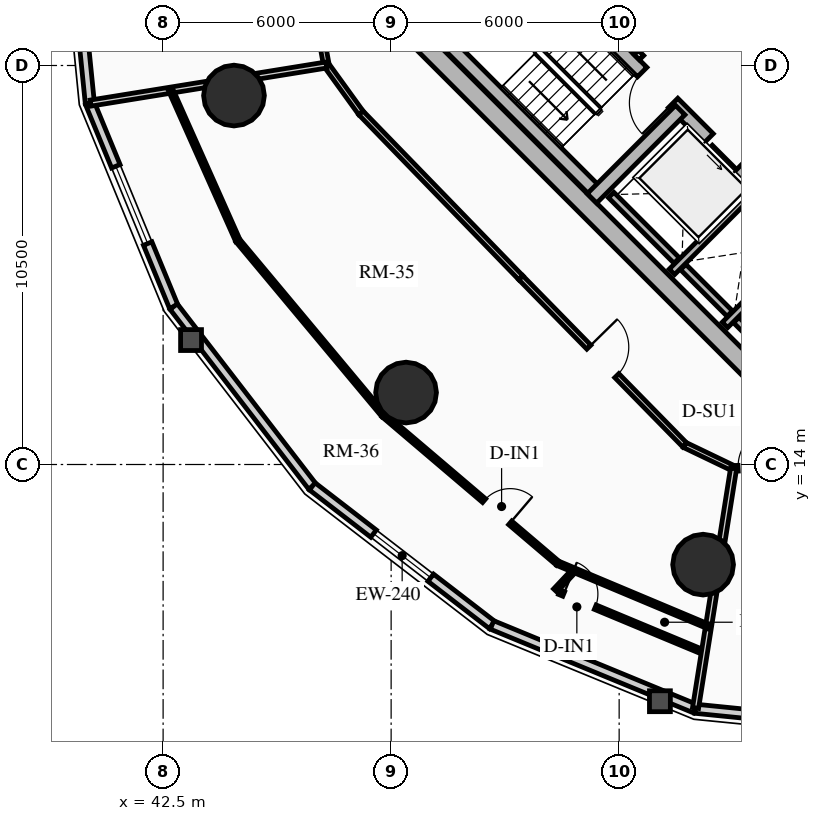
"""IFC4 building model, lengths in metres.
Left out: names, types, materials, properties, quantities, classifications, styles, units other than length and angle.
Written with IfcOpenShell. Run it as: python <this file> out.ifc"""

import sys

from ifc_helpers import new_model, si_unit, direction, frame, frame_2d, origin, origin_2d, place, context, subcontext, project, spatial, rectangle, circle, extrude, source, transform, mapped, element, fill, save


model = new_model("IFC4")
c1 = context("Model", 3, precision=1e-05, world=origin(), true_north=direction((0.0, 1.0)))
c2 = subcontext(c1, "Body", "Model", "MODEL_VIEW")
j1 = project(units=[si_unit("LENGTHUNIT", "METRE"), si_unit("PLANEANGLEUNIT", "RADIAN")], contexts=[c1])
p1 = place(None, origin())
s1 = spatial("IfcSite", under=j1, at=p1, CompositionType="ELEMENT")
p2 = place(p1, origin())
s2 = spatial("IfcBuilding", under=s1, at=p2, CompositionType="ELEMENT")
p3 = place(p2, frame((0.0, 0.0, 62.74)))
s3 = spatial("IfcBuildingStorey", under=s2, at=p3, CompositionType="ELEMENT", Elevation=62.74)
for number, where, z_axis, x_axis in (
    (1, (58.773, 15.661, 0.0), (0.0, 0.0, 1.0), (-0.707, 0.707, 0.0)),
    (2, (66.339, 23.227, 0.0), (0.0, 0.0, 1.0), (-0.707, 0.707, 0.0)),
):
    element("IfcWall", number, at=place(p3, frame(where, z_axis=z_axis, x_axis=x_axis)), inside=s3, PredefinedType="SHEAR", context=c2, shape_type="SweptSolid", body=[
        extrude(rectangle(XDim=14.3, YDim=0.5, at=frame_2d((7.15, 0.0))), origin(), (0.0, 0.0, 1.0), 2.91),
    ])
p4 = place(p3, frame((61.096, 18.338, 0.0), z_axis=(0.0, 0.0, 1.0), x_axis=(-0.707106781187, 0.707106781187, 0.0)))
e3 = element("IfcWall", 3, at=p4, inside=s3, PredefinedType="SHEAR", context=c2, shape_type="SweptSolid", body=[
    extrude(rectangle(XDim=13.8, YDim=0.35, at=frame_2d((6.9, 0.0))), origin(), (0.0, 0.0, 1.0), 2.91),
])
m1 = source(origin(), c2, "Body", "SweptSolid", [
    extrude(rectangle(XDim=1.1, YDim=2.015, at=frame_2d((0.55, 1.007))), frame((0.0, 0.185, 0.0), z_axis=(0.0, -1.0, 0.0), x_axis=(1.0, 0.0, 0.0)), (0.0, 0.0, 1.0), 0.37),
])
p5 = place(p4, frame((4.9, 0.0, 0.0)))
e4 = element("IfcOpeningElement", 4, at=p5, cuts=e3, PredefinedType="OPENING", context=c2, shape_type="MappedRepresentation", body=[
    mapped(m1, transform((0.0, 0.0, 0.0), x_axis=(1.0, 0.0, 0.0), y_axis=(0.0, 1.0, 0.0), z_axis=(0.0, 0.0, 1.0), scale=1.0)),
])
m2 = source(origin(), c2, "Body", "SweptSolid", [
    extrude(rectangle(XDim=1.15, YDim=2.02, at=frame_2d((0.575, 1.01))), frame((0.0, 0.185, 0.0), z_axis=(0.0, -1.0, 0.0), x_axis=(1.0, 0.0, 0.0)), (0.0, 0.0, 1.0), 0.37),
])
p6 = place(p4, frame((7.32, 0.0, 0.0)))
e5 = element("IfcOpeningElement", 5, at=p6, cuts=e3, PredefinedType="OPENING", context=c2, shape_type="MappedRepresentation", body=[
    mapped(m2, transform((0.0, 0.0, 0.0), x_axis=(1.0, 0.0, 0.0), y_axis=(0.0, 1.0, 0.0), z_axis=(0.0, 0.0, 1.0), scale=1.0)),
])
p7 = place(p3, frame((63.662, 20.904, 0.0), z_axis=(0.0, 0.0, 1.0), x_axis=(-0.707106781187, 0.707106781187, 0.0)))
e6 = element("IfcWall", 6, at=p7, inside=s3, PredefinedType="SHEAR", context=c2, shape_type="SweptSolid", body=[
    extrude(rectangle(XDim=13.8, YDim=0.35, at=frame_2d((6.9, 0.0))), origin(), (0.0, 0.0, 1.0), 2.91),
])
p8 = place(p7, frame((10.025, 0.0, 0.0)))
e7 = element("IfcOpeningElement", 7, at=p8, cuts=e6, PredefinedType="OPENING", context=c2, shape_type="MappedRepresentation", body=[
    mapped(m1, transform((0.0, 0.0, 0.0), x_axis=(1.0, 0.0, 0.0), y_axis=(0.0, 1.0, 0.0), z_axis=(0.0, 0.0, 1.0), scale=1.0)),
])
p9 = place(p7, frame((12.025, 0.0, 0.0)))
e8 = element("IfcOpeningElement", 8, at=p9, cuts=e6, PredefinedType="OPENING", context=c2, shape_type="MappedRepresentation", body=[
    mapped(m1, transform((0.0, 0.0, 0.0), x_axis=(1.0, 0.0, 0.0), y_axis=(0.0, 1.0, 0.0), z_axis=(0.0, 0.0, 1.0), scale=1.0)),
])
p10 = place(p7, frame((5.33, 0.0, 0.0)))
e9 = element("IfcOpeningElement", 9, at=p10, cuts=e6, PredefinedType="OPENING", context=c2, shape_type="MappedRepresentation", body=[
    mapped(m2, transform((0.0, 0.0, 0.0), x_axis=(1.0, 0.0, 0.0), y_axis=(0.0, 1.0, 0.0), z_axis=(0.0, 0.0, 1.0), scale=1.0)),
])
p11 = place(p3, frame((53.922, 21.141, 0.0), z_axis=(0.0, 0.0, 1.0), x_axis=(-0.707106781187, 0.707106781187, 0.0)))
e10 = element("IfcWall", 10, at=p11, inside=s3, PredefinedType="SHEAR", context=c2, shape_type="SweptSolid", body=[
    extrude(rectangle(XDim=6.745, YDim=0.35, at=frame_2d((3.373, 0.0))), origin(), (0.0, 0.0, 1.0), 2.91),
])
p12 = place(p3, frame((53.784, 21.003, 0.0), z_axis=(0.0, 0.0, 1.0), x_axis=(0.707106781187, 0.707106781187, 0.0)))
e11 = element("IfcWall", 11, at=p12, inside=s3, PredefinedType="SHEAR", context=c2, shape_type="SweptSolid", body=[
    extrude(rectangle(XDim=3.285, YDim=0.35, at=frame_2d((1.643, 0.0))), origin(), (0.0, 0.0, 1.0), 2.91),
])
for number, where, z_axis, x_axis in (
    (12, (44.365, 23.709, 0.0), (0.0, 0.0, 1.0), (1.0, 0.0, 0.0)),
    (13, (48.893, 15.893, 0.0), (0.0, 0.0, 1.0), (1.0, 0.0, 0.0)),
    (14, (56.709, 11.365, 0.0), (0.0, 0.0, 1.0), (1.0, 0.0, 0.0)),
):
    element("IfcColumn", number, at=place(p3, frame(where, z_axis=z_axis, x_axis=x_axis)), inside=s3, PredefinedType="USERDEFINED", context=c2, shape_type="SweptSolid", body=[
        extrude(circle(Radius=0.8, at=origin_2d()), origin(), (0.0, 0.0, 1.0), 2.91),
    ])
p13 = place(p3, frame((40.572, 23.507, 0.0), z_axis=(0.0, 0.0, 1.0), x_axis=(-0.100165739718, 0.994970765694, 0.0)))
e15 = element("IfcWall", 15, at=p13, inside=s3, PredefinedType="SOLIDWALL", context=c2, shape_type="SweptSolid", body=[
    extrude(rectangle(XDim=5.477, YDim=0.24, at=frame_2d((2.738, 0.0))), origin(), (0.0, 0.0, 1.0), 2.079),
])
m3 = source(origin(), c2, "Body", "SweptSolid", [
    extrude(rectangle(XDim=1.9, YDim=1.35, at=frame_2d((0.95, 0.675))), frame((0.0, 0.13, 0.0), z_axis=(0.0, -1.0, 0.0), x_axis=(1.0, 0.0, 0.0)), (0.0, 0.0, 1.0), 0.26),
])
p14 = place(p13, frame((1.788, 0.0, 0.65)))
e16 = element("IfcOpeningElement", 16, at=p14, cuts=e15, PredefinedType="OPENING", context=c2, shape_type="MappedRepresentation", body=[
    mapped(m3, transform((0.0, 0.0, 0.0), x_axis=(1.0, 0.0, 0.0), y_axis=(0.0, 1.0, 0.0), z_axis=(0.0, 0.0, 1.0), scale=1.0)),
])
p15 = place(p3, frame((42.778, 18.156, 0.0), z_axis=(0.0, 0.0, 1.0), x_axis=(-0.381027682565, 0.924563629567, 0.0)))
e17 = element("IfcWall", 17, at=p15, inside=s3, PredefinedType="SOLIDWALL", context=c2, shape_type="SweptSolid", body=[
    extrude(rectangle(XDim=5.789, YDim=0.24, at=frame_2d((2.894, 0.0))), origin(), (0.0, 0.0, 1.0), 2.079),
])
m4 = source(origin(), c2, "Body", "SweptSolid", [
    extrude(rectangle(XDim=2.2, YDim=1.35, at=frame_2d((1.1, 0.675))), frame((0.0, 0.13, 0.0), z_axis=(0.0, -1.0, 0.0), x_axis=(1.0, 0.0, 0.0)), (0.0, 0.0, 1.0), 0.26),
])
p16 = place(p15, frame((1.794, 0.0, 0.65)))
e18 = element("IfcOpeningElement", 18, at=p16, cuts=e17, PredefinedType="OPENING", context=c2, shape_type="MappedRepresentation", body=[
    mapped(m4, transform((0.0, 0.0, 0.0), x_axis=(1.0, 0.0, 0.0), y_axis=(0.0, 1.0, 0.0), z_axis=(0.0, 0.0, 1.0), scale=1.0)),
])
p17 = place(p3, frame((46.425, 13.425, 0.0), z_axis=(0.0, 0.0, 1.0), x_axis=(-0.610502519057, 0.792014314407, 0.0)))
e19 = element("IfcWall", 19, at=p17, inside=s3, PredefinedType="SOLIDWALL", context=c2, shape_type="SweptSolid", body=[
    extrude(rectangle(XDim=5.973, YDim=0.24, at=frame_2d((2.987, 0.0))), origin(), (0.0, 0.0, 1.0), 2.079),
])
p18 = place(p3, frame((51.156, 9.778, 0.0), z_axis=(0.0, 0.0, 1.0), x_axis=(-0.792014314407, 0.610502519057, 0.0)))
e20 = element("IfcWall", 20, at=p18, inside=s3, PredefinedType="SOLIDWALL", context=c2, shape_type="SweptSolid", body=[
    extrude(rectangle(XDim=5.973, YDim=0.24, at=frame_2d((2.987, 0.0))), origin(), (0.0, 0.0, 1.0), 2.079),
])
p19 = place(p18, frame((2.037, 0.0, 0.65)))
e21 = element("IfcOpeningElement", 21, at=p19, cuts=e20, PredefinedType="OPENING", context=c2, shape_type="MappedRepresentation", body=[
    mapped(m3, transform((0.0, 0.0, 0.0), x_axis=(1.0, 0.0, 0.0), y_axis=(0.0, 1.0, 0.0), z_axis=(0.0, 0.0, 1.0), scale=1.0)),
])
p20 = place(p3, frame((56.507, 7.572, 0.0), z_axis=(0.0, 0.0, 1.0), x_axis=(-0.924563629567, 0.381027682565, 0.0)))
e22 = element("IfcWall", 22, at=p20, inside=s3, PredefinedType="SOLIDWALL", context=c2, shape_type="SweptSolid", body=[
    extrude(rectangle(XDim=5.789, YDim=0.24, at=frame_2d((2.894, 0.0))), origin(), (0.0, 0.0, 1.0), 2.079),
])
p21 = place(p3, frame((61.957, 7.024, 0.0), z_axis=(0.0, 0.0, 1.0), x_axis=(-0.994970765694, 0.100165739718, 0.0)))
e23 = element("IfcWall", 23, at=p21, inside=s3, PredefinedType="SOLIDWALL", context=c2, shape_type="SweptSolid", body=[
    extrude(rectangle(XDim=5.477, YDim=0.24, at=frame_2d((2.738, 0.0))), origin(), (0.0, 0.0, 1.0), 2.079),
])
p22 = place(p21, frame((1.788, 0.0, 0.65)))
e24 = element("IfcOpeningElement", 24, at=p22, cuts=e23, PredefinedType="OPENING", context=c2, shape_type="MappedRepresentation", body=[
    mapped(m3, transform((0.0, 0.0, 0.0), x_axis=(1.0, 0.0, 0.0), y_axis=(0.0, 1.0, 0.0), z_axis=(0.0, 0.0, 1.0), scale=1.0)),
])
p23 = place(p3, frame((55.888, 19.069, 0.0), z_axis=(0.0, 0.0, 1.0), x_axis=(0.707106781187, 0.707106781187, 0.0)))
e25 = element("IfcWall", 25, at=p23, inside=s3, PredefinedType="SHEAR", context=c2, shape_type="SweptSolid", body=[
    extrude(rectangle(XDim=2.97, YDim=0.2, at=frame_2d((1.485, 0.0))), origin(), (0.0, 0.0, 1.0), 2.91),
])
p24 = place(p3, frame((56.015, 19.366, 0.0), z_axis=(0.0, 0.0, 1.0), x_axis=(-0.707106781187, 0.707106781187, 0.0)))
e26 = element("IfcWall", 26, at=p24, inside=s3, PredefinedType="SHEAR", context=c2, shape_type="SweptSolid", body=[
    extrude(rectangle(XDim=2.44, YDim=0.2, at=frame_2d((1.22, 0.0))), origin(), (0.0, 0.0, 1.0), 2.91),
])
p25 = place(p3, frame((57.284, 17.673, 0.0), z_axis=(0.0, 0.0, 1.0), x_axis=(0.707147878904, 0.70706568108, 0.0)))
e27 = element("IfcWall", 27, at=p25, inside=s3, PredefinedType="SHEAR", context=c2, shape_type="SweptSolid", body=[
    extrude(rectangle(XDim=2.97, YDim=0.2, at=frame_2d((1.485, 0.0))), origin(), (0.0, 0.0, 1.0), 2.91),
])
p26 = place(p3, frame((57.412, 17.97, 0.0), z_axis=(0.0, 0.0, 1.0), x_axis=(-0.707106781187, 0.707106781187, 0.0)))
e28 = element("IfcWall", 28, at=p26, inside=s3, PredefinedType="SHEAR", context=c2, shape_type="SweptSolid", body=[
    extrude(rectangle(XDim=1.735, YDim=0.2, at=frame_2d((0.867, 0.0))), origin(), (0.0, 0.0, 1.0), 2.91),
])
p27 = place(p3, frame((58.737, 16.644, 0.0), z_axis=(0.0, 0.0, 1.0), x_axis=(-0.707032117043, 0.707181437447, 0.0)))
e29 = element("IfcWall", 29, at=p27, inside=s3, PredefinedType="SHEAR", context=c2, shape_type="SweptSolid", body=[
    extrude(rectangle(XDim=1.635, YDim=0.2, at=frame_2d((0.817, 0.0))), origin(), (0.0, 0.0, 1.0), 2.91),
])
p28 = place(p3, frame((54.961, 24.719, 0.0), z_axis=(0.0, 0.0, 1.0), x_axis=(0.707106781187, 0.707106781187, 0.0)))
e30 = element("IfcWall", 30, at=p28, inside=s3, PredefinedType="PARTITIONING", context=c2, shape_type="SweptSolid", body=[
    extrude(rectangle(XDim=3.28, YDim=0.2, at=frame_2d((1.64, 0.0))), origin(), (0.0, 0.0, 1.0), 2.555),
])
m5 = source(origin(), c2, "Body", "SweptSolid", [
    extrude(rectangle(XDim=0.9, YDim=2.005, at=frame_2d((0.45, 1.002))), frame((0.0, 0.11, 0.0), z_axis=(0.0, -1.0, 0.0), x_axis=(1.0, 0.0, 0.0)), (0.0, 0.0, 1.0), 0.22),
])
p29 = place(p28, frame((0.16, 0.0, 0.0)))
e31 = element("IfcOpeningElement", 31, at=p29, cuts=e30, PredefinedType="OPENING", context=c2, shape_type="MappedRepresentation", body=[
    mapped(m5, transform((0.0, 0.0, 0.0), x_axis=(1.0, 0.0, 0.0), y_axis=(0.0, 1.0, 0.0), z_axis=(0.0, 0.0, 1.0), scale=1.0)),
])
p30 = place(p3, frame((46.543, 25.882, 0.0), z_axis=(0.0, 0.0, 1.0), x_axis=(0.181153502579, -0.983454832976, 0.0)))
e32 = element("IfcWall", 32, at=p30, inside=s3, PredefinedType="PARTITIONING", context=c2, shape_type="SweptSolid", body=[
    extrude(rectangle(XDim=1.392, YDim=0.15, at=frame_2d((0.696, 0.0))), origin(), (0.0, 0.0, 1.0), 2.079),
])
p31 = place(p3, frame((46.795, 24.513, 0.0), z_axis=(0.0, 0.0, 1.0), x_axis=(0.585628197524, -0.810579801294, 0.0)))
e33 = element("IfcWall", 33, at=p31, inside=s3, PredefinedType="PARTITIONING", context=c2, shape_type="SweptSolid", body=[
    extrude(rectangle(XDim=1.554, YDim=0.15, at=frame_2d((0.777, 0.0))), origin(), (0.0, 0.0, 1.0), 2.125),
])
p32 = place(p3, frame((47.706, 23.253, 0.0), z_axis=(0.0, 0.0, 1.0), x_axis=(0.696179266346, -0.717867974707, 0.0)))
e34 = element("IfcWall", 34, at=p32, inside=s3, PredefinedType="PARTITIONING", context=c2, shape_type="SweptSolid", body=[
    extrude(rectangle(XDim=6.045, YDim=0.15, at=frame_2d((3.022, 0.0))), origin(), (0.0, 0.0, 1.0), 2.555),
])
p33 = place(p3, frame((51.914, 18.914, 0.0), z_axis=(0.0, 0.0, 1.0), x_axis=(0.699999313799, -0.714143515465, 0.0)))
e35 = element("IfcWall", 35, at=p33, inside=s3, PredefinedType="PARTITIONING", context=c2, shape_type="SweptSolid", body=[
    extrude(rectangle(XDim=6.162, YDim=0.15, at=frame_2d((3.081, 0.0))), origin(), (0.0, 0.0, 1.0), 2.079),
])
m6 = source(origin(), c2, "Body", "SweptSolid", [
    extrude(rectangle(XDim=1.05, YDim=2.015, at=frame_2d((0.525, 1.007))), frame((0.0, 0.085, 0.0), z_axis=(0.0, -1.0, 0.0), x_axis=(1.0, 0.0, 0.0)), (0.0, 0.0, 1.0), 0.17),
])
p34 = place(p33, frame((2.556, 0.0, 0.0)))
e36 = element("IfcOpeningElement", 36, at=p34, cuts=e35, PredefinedType="OPENING", context=c2, shape_type="MappedRepresentation", body=[
    mapped(m6, transform((0.0, 0.0, 0.0), x_axis=(1.0, 0.0, 0.0), y_axis=(0.0, 1.0, 0.0), z_axis=(0.0, 0.0, 1.0), scale=1.0)),
])
p35 = place(p3, frame((56.227, 14.513, 0.0), z_axis=(0.0, 0.0, 1.0), x_axis=(0.901477579283, -0.432825801044, 0.0)))
e37 = element("IfcWall", 37, at=p35, inside=s3, PredefinedType="PARTITIONING", context=c2, shape_type="SweptSolid", body=[
    extrude(rectangle(XDim=1.424, YDim=0.15, at=frame_2d((0.712, 0.0))), origin(), (0.0, 0.0, 1.0), 2.125),
])
p36 = place(p3, frame((57.511, 13.897, 0.0), z_axis=(0.0, 0.0, 1.0), x_axis=(0.999024538494, 0.044158481476, 0.0)))
e38 = element("IfcWall", 38, at=p36, inside=s3, PredefinedType="PARTITIONING", context=c2, shape_type="SweptSolid", body=[
    extrude(rectangle(XDim=1.498, YDim=0.15, at=frame_2d((0.749, 0.0))), origin(), (0.0, 0.0, 1.0), 2.079),
])
p37 = place(p36, frame((0.12, 0.0, 0.0)))
e39 = element("IfcOpeningElement", 39, at=p37, cuts=e38, PredefinedType="OPENING", context=c2, shape_type="MappedRepresentation", body=[
    mapped(m6, transform((0.0, 0.0, 0.0), x_axis=(1.0, 0.0, 0.0), y_axis=(0.0, 1.0, 0.0), z_axis=(0.0, 0.0, 1.0), scale=1.0)),
])
p38 = place(p3, frame((46.795, 24.513, 0.0), z_axis=(0.0, 0.0, 1.0), x_axis=(-0.987194583954, -0.159520699005, 0.0)))
e40 = element("IfcWall", 40, at=p38, inside=s3, PredefinedType="PARTITIONING", context=c2, shape_type="SweptSolid", body=[
    extrude(rectangle(XDim=6.284, YDim=0.16, at=frame_2d((3.142, 0.0))), origin(), (0.0, 0.0, 1.0), 2.079),
])
p39 = place(p3, frame((57.511, 13.897, 0.0), z_axis=(0.0, 0.0, 1.0), x_axis=(-0.156759846635, -0.98763675027, 0.0)))
e41 = element("IfcWall", 41, at=p39, inside=s3, PredefinedType="PARTITIONING", context=c2, shape_type="SweptSolid", body=[
    extrude(rectangle(XDim=6.384, YDim=0.16, at=frame_2d((3.192, 0.0))), origin(), (0.0, 0.0, 1.0), 2.079),
])
p40 = place(p3, frame((42.701, 23.851, 0.0), z_axis=(0.0, 0.0, 1.0), x_axis=(0.407189252031, -0.913343808777, 0.0)))
e42 = element("IfcWall", 42, at=p40, inside=s3, PredefinedType="PARTITIONING", context=c2, shape_type="SweptSolid", body=[
    extrude(rectangle(XDim=4.332, YDim=0.125, at=frame_2d((2.166, 0.0))), origin(), (0.0, 0.0, 1.0), 2.079),
])
p41 = place(p3, frame((44.465, 19.895, 0.0), z_axis=(0.0, 0.0, 1.0), x_axis=(0.640822159577, -0.767689364128, 0.0)))
e43 = element("IfcWall", 43, at=p41, inside=s3, PredefinedType="PARTITIONING", context=c2, shape_type="SweptSolid", body=[
    extrude(rectangle(XDim=5.985, YDim=0.125, at=frame_2d((2.992, 0.0))), origin(), (0.0, 0.0, 1.0), 2.079),
])
p42 = place(p3, frame((48.3, 15.3, 0.0), z_axis=(0.0, 0.0, 1.0), x_axis=(0.761710135851, -0.647917949236, 0.0)))
e44 = element("IfcWall", 44, at=p42, inside=s3, PredefinedType="PARTITIONING", context=c2, shape_type="SweptSolid", body=[
    extrude(rectangle(XDim=6.02, YDim=0.125, at=frame_2d((3.01, 0.0))), origin(), (0.0, 0.0, 1.0), 2.555),
])
m7 = source(origin(), c2, "Body", "SweptSolid", [
    extrude(rectangle(XDim=0.9, YDim=2.005, at=frame_2d((0.45, 1.002))), frame((0.0, 0.073, 0.0), z_axis=(0.0, -1.0, 0.0), x_axis=(1.0, 0.0, 0.0)), (0.0, 0.0, 1.0), 0.145),
])
p43 = place(p42, frame((3.475, 0.0, 0.0)))
e45 = element("IfcOpeningElement", 45, at=p43, cuts=e44, PredefinedType="OPENING", context=c2, shape_type="MappedRepresentation", body=[
    mapped(m7, transform((0.0, 0.0, 0.0), x_axis=(1.0, 0.0, 0.0), y_axis=(0.0, 1.0, 0.0), z_axis=(0.0, 0.0, 1.0), scale=1.0)),
])
p44 = place(p3, frame((52.886, 11.4, 0.0), z_axis=(0.0, 0.0, 1.0), x_axis=(0.922079377612, -0.38700080282, 0.0)))
e46 = element("IfcWall", 46, at=p44, inside=s3, PredefinedType="PARTITIONING", context=c2, shape_type="SweptSolid", body=[
    extrude(rectangle(XDim=4.3, YDim=0.125, at=frame_2d((2.15, 0.0))), origin(), (0.0, 0.0, 1.0), 2.079),
])
p45 = place(p3, frame((53.275, 11.167, 0.0), z_axis=(0.0, 0.0, 1.0), x_axis=(-0.686191026002, -0.727421388079, 0.0)))
e47 = element("IfcWall", 47, at=p45, inside=s3, PredefinedType="PARTITIONING", context=c2, shape_type="SweptSolid", body=[
    extrude(rectangle(XDim=0.663, YDim=0.125, at=frame_2d((0.332, 0.0))), origin(), (0.0, 0.0, 1.0), 2.555),
])
p46 = place(p3, frame((52.93, 10.638, 0.0), z_axis=(0.0, 0.0, 1.0), x_axis=(0.923065985722, -0.384641633217, 0.0)))
e48 = element("IfcWall", 48, at=p46, inside=s3, PredefinedType="PARTITIONING", context=c2, shape_type="SweptSolid", body=[
    extrude(rectangle(XDim=3.963, YDim=0.125, at=frame_2d((1.981, 0.0))), origin(), (0.0, 0.0, 1.0), 2.079),
])
p47 = place(p46, frame((0.12, 0.0, 0.0)))
e49 = element("IfcOpeningElement", 49, at=p47, cuts=e48, PredefinedType="OPENING", context=c2, shape_type="MappedRepresentation", body=[
    mapped(m7, transform((0.0, 0.0, 0.0), x_axis=(1.0, 0.0, 0.0), y_axis=(0.0, 1.0, 0.0), z_axis=(0.0, 0.0, 1.0), scale=1.0)),
])
m8 = source(origin(), c2, "Body", "SweptSolid", [
    extrude(rectangle(XDim=2.2, YDim=1.35, at=frame_2d((1.1, 0.675))), frame((0.0, 0.03, 0.0), z_axis=(0.0, -1.0, 0.0), x_axis=(1.0, 0.0, 0.0)), (0.0, 0.0, 1.0), 0.06),
])
p48 = place(p16, origin())
e50 = element("IfcWindow", 50, at=p48, inside=s3, PartitioningType="DOUBLE_PANEL_VERTICAL", PredefinedType="WINDOW", context=c2, shape_type="MappedRepresentation", body=[
    mapped(m8, transform((0.0, 0.0, 0.0), x_axis=(1.0, 0.0, 0.0), y_axis=(0.0, 1.0, 0.0), z_axis=(0.0, 0.0, 1.0), scale=1.0)),
])
fill(e18, e50)
m9 = source(origin(), c2, "Body", "SweptSolid", [
    extrude(rectangle(XDim=1.9, YDim=1.35, at=frame_2d((0.95, 0.675))), frame((0.0, 0.03, 0.0), z_axis=(0.0, -1.0, 0.0), x_axis=(1.0, 0.0, 0.0)), (0.0, 0.0, 1.0), 0.06),
])
p49 = place(p19, origin())
e51 = element("IfcWindow", 51, at=p49, inside=s3, PartitioningType="DOUBLE_PANEL_VERTICAL", PredefinedType="WINDOW", context=c2, shape_type="MappedRepresentation", body=[
    mapped(m9, transform((0.0, 0.0, 0.0), x_axis=(1.0, 0.0, 0.0), y_axis=(0.0, 1.0, 0.0), z_axis=(0.0, 0.0, 1.0), scale=1.0)),
])
fill(e21, e51)
m10 = source(origin(), c2, "Body", "SweptSolid", [
    extrude(rectangle(XDim=1.1, YDim=2.015, at=frame_2d((0.55, 1.007))), frame((0.0, 0.025, 0.0), z_axis=(0.0, -1.0, 0.0), x_axis=(1.0, 0.0, 0.0)), (0.0, 0.0, 1.0), 0.05),
])
p50 = place(p5, origin())
e52 = element("IfcDoor", 52, at=p50, inside=s3, OperationType="SLIDING_TO_LEFT", PredefinedType="DOOR", context=c2, shape_type="MappedRepresentation", body=[
    mapped(m10, transform((0.0, 0.0, 0.0), x_axis=(1.0, 0.0, 0.0), y_axis=(0.0, 1.0, 0.0), z_axis=(0.0, 0.0, 1.0), scale=1.0)),
])
fill(e4, e52)
m11 = source(origin(), c2, "Body", "SweptSolid", [
    extrude(rectangle(XDim=1.15, YDim=2.02, at=frame_2d((0.575, 1.01))), frame((0.0, 0.025, 0.0), z_axis=(0.0, -1.0, 0.0), x_axis=(1.0, 0.0, 0.0)), (0.0, 0.0, 1.0), 0.05),
])
p51 = place(p6, origin())
e53 = element("IfcDoor", 53, at=p51, inside=s3, OperationType="SINGLE_SWING_LEFT", PredefinedType="DOOR", context=c2, shape_type="MappedRepresentation", body=[
    mapped(m11, transform((0.0, 0.0, 0.0), x_axis=(1.0, 0.0, 0.0), y_axis=(0.0, 1.0, 0.0), z_axis=(0.0, 0.0, 1.0), scale=1.0)),
])
fill(e5, e53)
m12 = source(origin(), c2, "Body", "SweptSolid", [
    extrude(rectangle(XDim=0.9, YDim=2.005, at=frame_2d((0.45, 1.002))), frame((0.0, 0.025, 0.0), z_axis=(0.0, -1.0, 0.0), x_axis=(1.0, 0.0, 0.0)), (0.0, 0.0, 1.0), 0.05),
])
p52 = place(p29, origin())
e54 = element("IfcDoor", 54, at=p52, inside=s3, OperationType="SINGLE_SWING_LEFT", PredefinedType="DOOR", context=c2, shape_type="MappedRepresentation", body=[
    mapped(m12, transform((0.0, 0.0, 0.0), x_axis=(1.0, 0.0, 0.0), y_axis=(0.0, 1.0, 0.0), z_axis=(0.0, 0.0, 1.0), scale=1.0)),
])
fill(e31, e54)
m13 = source(origin(), c2, "Body", "SweptSolid", [
    extrude(rectangle(XDim=1.05, YDim=2.015, at=frame_2d((0.525, 1.007))), frame((0.0, 0.025, 0.0), z_axis=(0.0, -1.0, 0.0), x_axis=(1.0, 0.0, 0.0)), (0.0, 0.0, 1.0), 0.05),
])
p53 = place(p34, origin())
e55 = element("IfcDoor", 55, at=p53, inside=s3, OperationType="SINGLE_SWING_LEFT", PredefinedType="DOOR", context=c2, shape_type="MappedRepresentation", body=[
    mapped(m13, transform((0.0, 0.0, 0.0), x_axis=(1.0, 0.0, 0.0), y_axis=(0.0, 1.0, 0.0), z_axis=(0.0, 0.0, 1.0), scale=1.0)),
])
fill(e36, e55)
p54 = place(p43, origin())
e56 = element("IfcDoor", 56, at=p54, inside=s3, OperationType="SINGLE_SWING_RIGHT", PredefinedType="DOOR", context=c2, shape_type="MappedRepresentation", body=[
    mapped(m12, transform((0.0, 0.0, 0.0), x_axis=(1.0, 0.0, 0.0), y_axis=(0.0, 1.0, 0.0), z_axis=(0.0, 0.0, 1.0), scale=1.0)),
])
fill(e45, e56)
p55 = place(p47, origin())
e57 = element("IfcDoor", 57, at=p55, inside=s3, OperationType="SINGLE_SWING_LEFT", PredefinedType="DOOR", context=c2, shape_type="MappedRepresentation", body=[
    mapped(m12, transform((0.0, 0.0, 0.0), x_axis=(1.0, 0.0, 0.0), y_axis=(0.0, 1.0, 0.0), z_axis=(0.0, 0.0, 1.0), scale=1.0)),
])
fill(e49, e57)
p56 = place(p37, origin())
e58 = element("IfcDoor", 58, at=p56, inside=s3, OperationType="SINGLE_SWING_RIGHT", PredefinedType="DOOR", context=c2, shape_type="MappedRepresentation", body=[
    mapped(m13, transform((0.0, 0.0, 0.0), x_axis=(1.0, 0.0, 0.0), y_axis=(0.0, 1.0, 0.0), z_axis=(0.0, 0.0, 1.0), scale=1.0)),
])
fill(e39, e58)
save(model, sys.argv[1])
